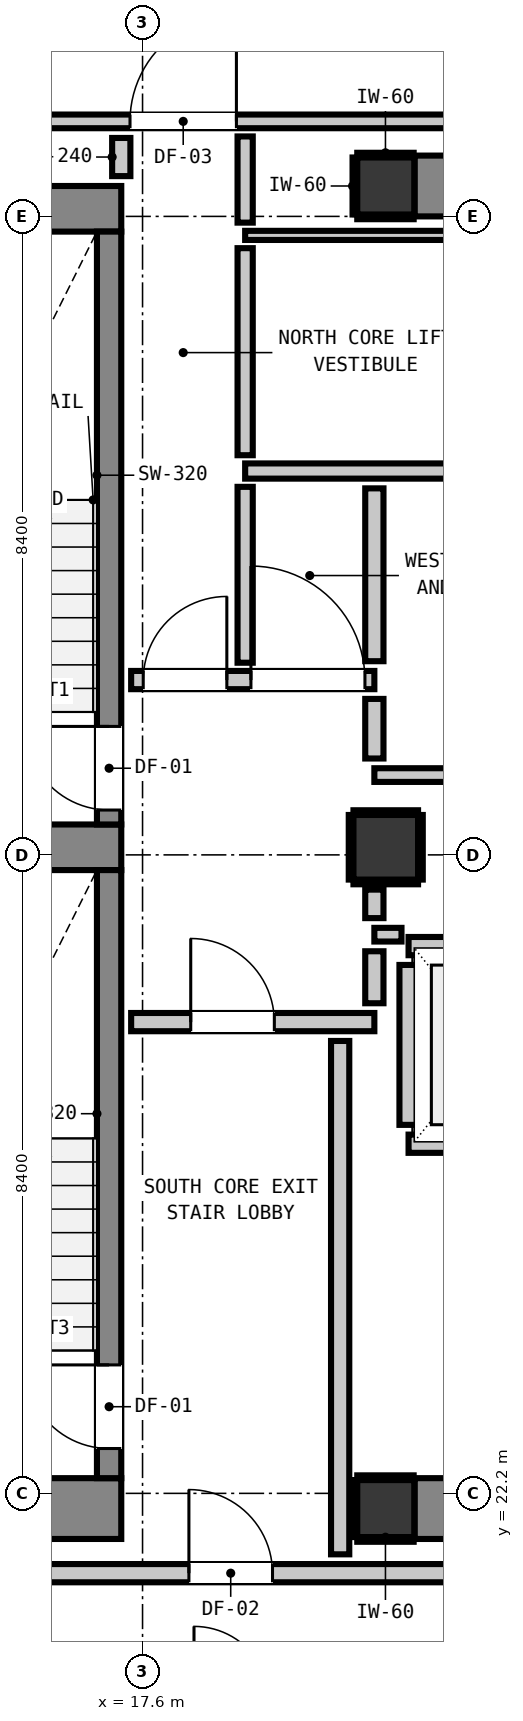
"""IFC4 building model, lengths in metres.
Left out: names, types, materials, properties, quantities, classifications, styles, units other than length and angle.
Written with IfcOpenShell. Run it as: python <this file> out.ifc"""

import sys

from ifc_helpers import new_model, si_unit, direction, frame, frame_2d, origin, origin_2d, place, context, subcontext, project, spatial, rectangle, extrude, element, fill, save


model = new_model("IFC4")
c1 = context("Model", 3, precision=1e-05, world=origin(), true_north=direction((0.0, 1.0)))
c2 = subcontext(c1, "Body", "Model", "MODEL_VIEW")
j1 = project(units=[si_unit("LENGTHUNIT", "METRE"), si_unit("PLANEANGLEUNIT", "RADIAN")], contexts=[c1])
p1 = place(None, origin())
s1 = spatial("IfcSite", under=j1, at=p1, CompositionType="ELEMENT")
p2 = place(p1, origin())
s2 = spatial("IfcBuilding", under=s1, at=p2, CompositionType="ELEMENT")
p3 = place(p2, frame((0.0, 0.0, 210.08)))
s3 = spatial("IfcBuildingStorey", under=s2, at=p3, CompositionType="ELEMENT", Elevation=210.08)
for number, where, z_axis, x_axis in (
    (1, (20.8, 22.0, 0.0), (0.0, 0.0, 1.0), (1.0, 0.0, 0.0)),
    (2, (20.8, 39.4, 0.0), (0.0, 0.0, 1.0), (1.0, 0.0, 0.0)),
):
    element("IfcColumn", number, at=place(p3, frame(where, z_axis=z_axis, x_axis=x_axis)), inside=s3, PredefinedType="COLUMN", context=c2, shape_type="SweptSolid", body=[
        extrude(rectangle(XDim=0.75, YDim=0.75, at=origin_2d()), origin(), (0.0, 0.0, 1.0), 3.32),
    ])
p4 = place(p3, frame((13.24, 22.0, 0.0), z_axis=(0.0, 0.0, 1.0), x_axis=(1.0, 0.0, 0.0)))
e3 = element("IfcWall", 3, at=p4, inside=s3, PredefinedType="SHEAR", context=c2, shape_type="SweptSolid", body=[
    extrude(rectangle(XDim=4.08, YDim=0.8, at=frame_2d((2.04, 0.0))), origin(), (0.0, 0.0, 1.0), 3.32),
])
p5 = place(p3, frame((13.24, 39.1, 0.0), z_axis=(0.0, 0.0, 1.0), x_axis=(1.0, 0.0, 0.0)))
e4 = element("IfcWall", 4, at=p5, inside=s3, PredefinedType="SHEAR", context=c2, shape_type="SweptSolid", body=[
    extrude(rectangle(XDim=4.08, YDim=0.6, at=frame_2d((2.04, 0.0))), origin(), (0.0, 0.0, 1.0), 3.32),
])
p6 = place(p3, frame((13.78, 30.7, 0.0), z_axis=(0.0, 0.0, 1.0), x_axis=(1.0, 0.0, 0.0)))
e5 = element("IfcWall", 5, at=p6, inside=s3, PredefinedType="SHEAR", context=c2, shape_type="SweptSolid", body=[
    extrude(rectangle(XDim=3.54, YDim=0.6, at=frame_2d((1.77, 0.0))), origin(), (0.0, 0.0, 1.0), 3.32),
])
for number, where, z_axis, x_axis in (
    (6, (21.18, 22.0, 0.0), (0.0, 0.0, 1.0), (1.0, 0.0, 0.0)),
    (7, (21.18, 39.4, 0.0), (0.0, 0.0, 1.0), (1.0, 0.0, 0.0)),
):
    element("IfcWall", number, at=place(p3, frame(where, z_axis=z_axis, x_axis=x_axis)), inside=s3, PredefinedType="SHEAR", context=c2, shape_type="SweptSolid", body=[
        extrude(rectangle(XDim=7.64, YDim=0.8, at=frame_2d((3.82, 0.0))), origin(), (0.0, 0.0, 1.0), 3.32),
    ])
p7 = place(p3, frame((17.16, 31.0, 0.0), z_axis=(0.0, 0.0, 1.0), x_axis=(0.0, 1.0, 0.0)))
e8 = element("IfcWall", 8, at=p7, inside=s3, PredefinedType="SHEAR", context=c2, shape_type="SweptSolid", body=[
    extrude(rectangle(XDim=7.8, YDim=0.32, at=frame_2d((3.9, 0.0))), origin(), (0.0, 0.0, 1.0), 3.32),
])
p8 = place(p7, frame((0.19, 0.0, 0.0)))
e9 = element("IfcOpeningElement", 9, at=p8, cuts=e8, PredefinedType="OPENING", context=c2, shape_type="SweptSolid", body=[
    extrude(rectangle(XDim=1.1, YDim=2.15, at=frame_2d((0.55, 1.075))), frame((0.0, 0.17, 0.0), z_axis=(0.0, -1.0, 0.0), x_axis=(1.0, 0.0, 0.0)), (0.0, 0.0, 1.0), 0.34),
])
p9 = place(p3, frame((17.16, 22.4, 0.0), z_axis=(0.0, 0.0, 1.0), x_axis=(0.0, 1.0, 0.0)))
e10 = element("IfcWall", 10, at=p9, inside=s3, PredefinedType="SHEAR", context=c2, shape_type="SweptSolid", body=[
    extrude(rectangle(XDim=8.0, YDim=0.32, at=frame_2d((4.0, 0.0))), origin(), (0.0, 0.0, 1.0), 3.32),
])
p10 = place(p9, frame((0.39, 0.0, 0.0)))
e11 = element("IfcOpeningElement", 11, at=p10, cuts=e10, PredefinedType="OPENING", context=c2, shape_type="SweptSolid", body=[
    extrude(rectangle(XDim=1.1, YDim=2.15, at=frame_2d((0.55, 1.075))), frame((0.0, 0.17, 0.0), z_axis=(0.0, -1.0, 0.0), x_axis=(1.0, 0.0, 0.0)), (0.0, 0.0, 1.0), 0.34),
])
p11 = place(p3, frame((20.8, 30.7, 0.0), z_axis=(0.0, 0.0, 1.0), x_axis=(1.0, 0.0, 0.0)))
e12 = element("IfcColumn", 12, at=p11, inside=s3, PredefinedType="COLUMN", context=c2, shape_type="SweptSolid", body=[
    extrude(rectangle(XDim=0.85, YDim=0.85, at=origin_2d()), origin(), (0.0, 0.0, 1.0), 3.32),
])
for number, where, z_axis, x_axis in (
    (13, (21.1, 26.8, 0.0), (0.0, 0.0, 1.0), (1.0, 0.0, 0.0)),
    (14, (21.1, 29.4, 0.0), (0.0, 0.0, 1.0), (1.0, 0.0, 0.0)),
):
    element("IfcWall", number, at=place(p3, frame(where, z_axis=z_axis, x_axis=x_axis)), inside=s3, PredefinedType="PARTITIONING", context=c2, shape_type="SweptSolid", body=[
        extrude(rectangle(XDim=2.2, YDim=0.24, at=frame_2d((1.1, 0.0))), origin(), (0.0, 0.0, 1.0), 3.1),
    ])
p12 = place(p3, frame((21.1, 27.048, 0.0), z_axis=(0.0, 0.0, 1.0), x_axis=(0.0, 1.0, 0.0)))
e15 = element("IfcWall", 15, at=p12, inside=s3, PredefinedType="PARTITIONING", context=c2, shape_type="SweptSolid", body=[
    extrude(rectangle(XDim=2.104, YDim=0.24, at=frame_2d((1.052, 0.0))), origin(), (0.0, 0.0, 1.0), 2.335),
])
p13 = place(p3, frame((10.787, 21.15, 0.0), z_axis=(0.0, 0.0, 1.0), x_axis=(1.0, 0.0, 0.0)))
e16 = element("IfcWall", 16, at=p13, inside=s3, PredefinedType="PARTITIONING", context=c2, shape_type="SweptSolid", body=[
    extrude(rectangle(XDim=36.626, YDim=0.24, at=frame_2d((18.313, 0.0))), origin(), (0.0, 0.0, 1.0), 3.1),
])
p14 = place(p13, frame((7.423, 0.0, 0.0)))
e17 = element("IfcOpeningElement", 17, at=p14, cuts=e16, PredefinedType="OPENING", context=c2, shape_type="SweptSolid", body=[
    extrude(rectangle(XDim=1.1, YDim=2.15, at=frame_2d((0.55, 1.075))), frame((0.0, 0.13, 0.0), z_axis=(0.0, -1.0, 0.0), x_axis=(1.0, 0.0, 0.0)), (0.0, 0.0, 1.0), 0.26),
])
p15 = place(p13, frame((31.482, 0.0, 0.0)))
e18 = element("IfcOpeningElement", 18, at=p15, cuts=e16, PredefinedType="OPENING", context=c2, shape_type="SweptSolid", body=[
    extrude(rectangle(XDim=1.0, YDim=2.15, at=frame_2d((0.5, 1.075))), frame((0.0, 0.13, 0.0), z_axis=(0.0, -1.0, 0.0), x_axis=(1.0, 0.0, 0.0)), (0.0, 0.0, 1.0), 0.26),
])
p16 = place(p3, frame((17.45, 28.4, 0.0), z_axis=(0.0, 0.0, 1.0), x_axis=(1.0, 0.0, 0.0)))
e19 = element("IfcWall", 19, at=p16, inside=s3, PredefinedType="PARTITIONING", context=c2, shape_type="SweptSolid", body=[
    extrude(rectangle(XDim=3.2, YDim=0.24, at=frame_2d((1.6, 0.0))), origin(), (0.0, 0.0, 1.0), 3.1),
])
p17 = place(p16, frame((0.784, 0.0, 0.0)))
e20 = element("IfcOpeningElement", 20, at=p17, cuts=e19, PredefinedType="OPENING", context=c2, shape_type="SweptSolid", body=[
    extrude(rectangle(XDim=1.1, YDim=2.15, at=frame_2d((0.55, 1.075))), frame((0.0, 0.13, 0.0), z_axis=(0.0, -1.0, 0.0), x_axis=(1.0, 0.0, 0.0)), (0.0, 0.0, 1.0), 0.26),
])
p18 = place(p3, frame((17.45, 32.9, 0.0), z_axis=(0.0, 0.0, 1.0), x_axis=(1.0, 0.0, 0.0)))
e21 = element("IfcWall", 21, at=p18, inside=s3, PredefinedType="PARTITIONING", context=c2, shape_type="SweptSolid", body=[
    extrude(rectangle(XDim=3.2, YDim=0.24, at=frame_2d((1.6, 0.0))), origin(), (0.0, 0.0, 1.0), 3.1),
])
p19 = place(p18, frame((0.159, 0.0, 0.0)))
e22 = element("IfcOpeningElement", 22, at=p19, cuts=e21, PredefinedType="OPENING", context=c2, shape_type="SweptSolid", body=[
    extrude(rectangle(XDim=1.1, YDim=2.15, at=frame_2d((0.55, 1.075))), frame((0.0, 0.13, 0.0), z_axis=(0.0, -1.0, 0.0), x_axis=(1.0, 0.0, 0.0)), (0.0, 0.0, 1.0), 0.26),
])
p20 = place(p18, frame((1.576, 0.0, 0.0)))
e23 = element("IfcOpeningElement", 23, at=p20, cuts=e21, PredefinedType="OPENING", context=c2, shape_type="SweptSolid", body=[
    extrude(rectangle(XDim=1.5, YDim=2.15, at=frame_2d((0.75, 1.075))), frame((0.0, 0.13, 0.0), z_axis=(0.0, -1.0, 0.0), x_axis=(1.0, 0.0, 0.0)), (0.0, 0.0, 1.0), 0.26),
])
p21 = place(p3, frame((18.95, 35.65, 0.0), z_axis=(0.0, 0.0, 1.0), x_axis=(1.0, 0.0, 0.0)))
e24 = element("IfcWall", 24, at=p21, inside=s3, PredefinedType="PARTITIONING", context=c2, shape_type="SweptSolid", body=[
    extrude(rectangle(XDim=11.025, YDim=0.2, at=frame_2d((5.513, 0.0))), origin(), (0.0, 0.0, 1.0), 3.1),
])
p22 = place(p21, frame((9.749, 0.0, 0.0)))
e25 = element("IfcOpeningElement", 25, at=p22, cuts=e24, PredefinedType="OPENING", context=c2, shape_type="SweptSolid", body=[
    extrude(rectangle(XDim=0.9, YDim=2.1, at=frame_2d((0.45, 1.05))), frame((0.0, 0.11, 0.0), z_axis=(0.0, -1.0, 0.0), x_axis=(1.0, 0.0, 0.0)), (0.0, 0.0, 1.0), 0.22),
])
p23 = place(p3, frame((20.65, 29.55, 0.0), z_axis=(0.0, 0.0, 1.0), x_axis=(1.0, 0.0, 0.0)))
e26 = element("IfcWall", 26, at=p23, inside=s3, PredefinedType="PARTITIONING", context=c2, shape_type="SweptSolid", body=[
    extrude(rectangle(XDim=0.357, YDim=0.18, at=frame_2d((0.179, 0.0))), origin(), (0.0, 0.0, 1.0), 3.1),
])
p24 = place(p3, frame((20.65, 31.65, 0.0), z_axis=(0.0, 0.0, 1.0), x_axis=(1.0, 0.0, 0.0)))
e27 = element("IfcWall", 27, at=p24, inside=s3, PredefinedType="PARTITIONING", context=c2, shape_type="SweptSolid", body=[
    extrude(rectangle(XDim=7.7, YDim=0.18, at=frame_2d((3.85, 0.0))), origin(), (0.0, 0.0, 1.0), 3.1),
])
p25 = place(p24, frame((4.673, 0.0, 0.0)))
e28 = element("IfcOpeningElement", 28, at=p25, cuts=e27, PredefinedType="OPENING", context=c2, shape_type="SweptSolid", body=[
    extrude(rectangle(XDim=0.9, YDim=2.1, at=frame_2d((0.45, 1.05))), frame((0.0, 0.1, 0.0), z_axis=(0.0, -1.0, 0.0), x_axis=(1.0, 0.0, 0.0)), (0.0, 0.0, 1.0), 0.2),
])
p26 = place(p3, frame((10.787, 40.25, 0.0), z_axis=(0.0, 0.0, 1.0), x_axis=(1.0, 0.0, 0.0)))
e29 = element("IfcWall", 29, at=p26, inside=s3, PredefinedType="PARTITIONING", context=c2, shape_type="SweptSolid", body=[
    extrude(rectangle(XDim=26.102, YDim=0.18, at=frame_2d((13.051, 0.0))), origin(), (0.0, 0.0, 1.0), 3.1),
])
p27 = place(p26, frame((6.648, 0.0, 0.0)))
e30 = element("IfcOpeningElement", 30, at=p27, cuts=e29, PredefinedType="OPENING", context=c2, shape_type="SweptSolid", body=[
    extrude(rectangle(XDim=1.4, YDim=2.15, at=frame_2d((0.7, 1.075))), frame((0.0, 0.1, 0.0), z_axis=(0.0, -1.0, 0.0), x_axis=(1.0, 0.0, 0.0)), (0.0, 0.0, 1.0), 0.2),
])
p28 = place(p3, frame((18.95, 38.75, 0.0), z_axis=(0.0, 0.0, 1.0), x_axis=(1.0, 0.0, 0.0)))
e31 = element("IfcWall", 31, at=p28, inside=s3, PredefinedType="PARTITIONING", context=c2, shape_type="SweptSolid", body=[
    extrude(rectangle(XDim=13.56, YDim=0.12, at=frame_2d((6.78, 0.0))), origin(), (0.0, 0.0, 1.0), 3.1),
])
p29 = place(p3, frame((17.32, 39.53, 0.0), z_axis=(0.0, 0.0, 1.0), x_axis=(0.0, 1.0, 0.0)))
e32 = element("IfcWall", 32, at=p29, inside=s3, PredefinedType="PARTITIONING", context=c2, shape_type="SweptSolid", body=[
    extrude(rectangle(XDim=0.502, YDim=0.24, at=frame_2d((0.251, 0.0))), origin(), (0.0, 0.0, 1.0), 3.1),
])
p30 = place(p3, frame((20.2, 21.398, 0.0), z_axis=(0.0, 0.0, 1.0), x_axis=(0.0, 1.0, 0.0)))
e33 = element("IfcWall", 33, at=p30, inside=s3, PredefinedType="PARTITIONING", context=c2, shape_type="SweptSolid", body=[
    extrude(rectangle(XDim=6.754, YDim=0.24, at=frame_2d((3.377, 0.0))), origin(), (0.0, 0.0, 1.0), 3.1),
])
p31 = place(p3, frame((20.65, 28.648, 0.0), z_axis=(0.0, 0.0, 1.0), x_axis=(0.0, 1.0, 0.0)))
e34 = element("IfcWall", 34, at=p31, inside=s3, PredefinedType="PARTITIONING", context=c2, shape_type="SweptSolid", body=[
    extrude(rectangle(XDim=0.684, YDim=0.24, at=frame_2d((0.342, 0.0))), origin(), (0.0, 0.0, 1.0), 2.335),
])
p32 = place(p3, frame((20.65, 29.768, 0.0), z_axis=(0.0, 0.0, 1.0), x_axis=(0.0, 1.0, 0.0)))
e35 = element("IfcWall", 35, at=p32, inside=s3, PredefinedType="PARTITIONING", context=c2, shape_type="SweptSolid", body=[
    extrude(rectangle(XDim=0.375, YDim=0.24, at=frame_2d((0.188, 0.0))), origin(), (0.0, 0.0, 1.0), 2.335),
])
p33 = place(p3, frame((20.65, 31.868, 0.0), z_axis=(0.0, 0.0, 1.0), x_axis=(0.0, 1.0, 0.0)))
e36 = element("IfcWall", 36, at=p33, inside=s3, PredefinedType="PARTITIONING", context=c2, shape_type="SweptSolid", body=[
    extrude(rectangle(XDim=0.784, YDim=0.24, at=frame_2d((0.392, 0.0))), origin(), (0.0, 0.0, 1.0), 2.335),
])
p34 = place(p3, frame((20.65, 33.148, 0.0), z_axis=(0.0, 0.0, 1.0), x_axis=(0.0, 1.0, 0.0)))
e37 = element("IfcWall", 37, at=p34, inside=s3, PredefinedType="PARTITIONING", context=c2, shape_type="SweptSolid", body=[
    extrude(rectangle(XDim=2.274, YDim=0.24, at=frame_2d((1.137, 0.0))), origin(), (0.0, 0.0, 1.0), 2.335),
])
p35 = place(p3, frame((18.95, 33.128, 0.0), z_axis=(0.0, 0.0, 1.0), x_axis=(0.0, 1.0, 0.0)))
e38 = element("IfcWall", 38, at=p35, inside=s3, PredefinedType="PARTITIONING", context=c2, shape_type="SweptSolid", body=[
    extrude(rectangle(XDim=2.314, YDim=0.2, at=frame_2d((1.157, 0.0))), origin(), (0.0, 0.0, 1.0), 3.1),
])
p36 = place(p3, frame((18.95, 35.858, 0.0), z_axis=(0.0, 0.0, 1.0), x_axis=(0.0, 1.0, 0.0)))
e39 = element("IfcWall", 39, at=p36, inside=s3, PredefinedType="PARTITIONING", context=c2, shape_type="SweptSolid", body=[
    extrude(rectangle(XDim=2.724, YDim=0.2, at=frame_2d((1.362, 0.0))), origin(), (0.0, 0.0, 1.0), 3.1),
])
p37 = place(p3, frame((18.95, 38.918, 0.0), z_axis=(0.0, 0.0, 1.0), x_axis=(0.0, 1.0, 0.0)))
e40 = element("IfcWall", 40, at=p37, inside=s3, PredefinedType="PARTITIONING", context=c2, shape_type="SweptSolid", body=[
    extrude(rectangle(XDim=1.134, YDim=0.2, at=frame_2d((0.567, 0.0))), origin(), (0.0, 0.0, 1.0), 3.1),
])
for number, where, z_axis, x_axis in (
    (41, (20.425, 21.593, 0.0), (0.0, 0.0, 1.0), (1.0, 0.0, 0.0)),
    (42, (20.425, 22.407, 0.0), (0.0, 0.0, 1.0), (1.0, 0.0, 0.0)),
):
    element("IfcWall", number, at=place(p3, frame(where, z_axis=z_axis, x_axis=x_axis)), inside=s3, PredefinedType="PARTITIONING", context=c2, shape_type="SweptSolid", body=[
        extrude(rectangle(XDim=0.742, YDim=0.06, at=frame_2d((0.371, 0.0))), origin(), (0.0, 0.0, 1.0), 1.45),
    ])
p38 = place(p3, frame((20.393, 21.625, 0.0), z_axis=(0.0, 0.0, 1.0), x_axis=(0.0, 1.0, 0.0)))
e43 = element("IfcWall", 43, at=p38, inside=s3, PredefinedType="PARTITIONING", context=c2, shape_type="SweptSolid", body=[
    extrude(rectangle(XDim=0.75, YDim=0.06, at=frame_2d((0.375, 0.0))), origin(), (0.0, 0.0, 1.0), 1.45),
])
for number, where, z_axis, x_axis in (
    (44, (20.425, 38.993, 0.0), (0.0, 0.0, 1.0), (1.0, 0.0, 0.0)),
    (45, (20.425, 39.807, 0.0), (0.0, 0.0, 1.0), (1.0, 0.0, 0.0)),
):
    element("IfcWall", number, at=place(p3, frame(where, z_axis=z_axis, x_axis=x_axis)), inside=s3, PredefinedType="PARTITIONING", context=c2, shape_type="SweptSolid", body=[
        extrude(rectangle(XDim=0.742, YDim=0.06, at=frame_2d((0.371, 0.0))), origin(), (0.0, 0.0, 1.0), 1.45),
    ])
p39 = place(p3, frame((20.393, 39.025, 0.0), z_axis=(0.0, 0.0, 1.0), x_axis=(0.0, 1.0, 0.0)))
e46 = element("IfcWall", 46, at=p39, inside=s3, PredefinedType="PARTITIONING", context=c2, shape_type="SweptSolid", body=[
    extrude(rectangle(XDim=0.75, YDim=0.06, at=frame_2d((0.375, 0.0))), origin(), (0.0, 0.0, 1.0), 1.45),
])
for number, where, z_axis, x_axis in (
    (47, (20.375, 30.243, 0.0), (0.0, 0.0, 1.0), (1.0, 0.0, 0.0)),
    (48, (20.375, 31.157, 0.0), (0.0, 0.0, 1.0), (1.0, 0.0, 0.0)),
    (49, (20.343, 30.275, 0.0), (0.0, 0.0, 1.0), (0.0, 1.0, 0.0)),
    (50, (21.257, 30.275, 0.0), (0.0, 0.0, 1.0), (0.0, 1.0, 0.0)),
):
    element("IfcWall", number, at=place(p3, frame(where, z_axis=z_axis, x_axis=x_axis)), inside=s3, PredefinedType="PARTITIONING", context=c2, shape_type="SweptSolid", body=[
        extrude(rectangle(XDim=0.85, YDim=0.06, at=frame_2d((0.425, 0.0))), origin(), (0.0, 0.0, 1.0), 1.45),
    ])
p40 = place(p8, origin())
e51 = element("IfcDoor", 51, at=p40, inside=s3, OperationType="SINGLE_SWING_RIGHT", PredefinedType="DOOR", context=c2, shape_type="SweptSolid", body=[
    extrude(rectangle(XDim=1.1, YDim=2.15, at=frame_2d((0.55, 1.075))), frame((0.0, 0.025, 0.0), z_axis=(0.0, -1.0, 0.0), x_axis=(1.0, 0.0, 0.0)), (0.0, 0.0, 1.0), 0.05),
])
fill(e9, e51)
p41 = place(p10, origin())
e52 = element("IfcDoor", 52, at=p41, inside=s3, OperationType="SINGLE_SWING_RIGHT", PredefinedType="DOOR", context=c2, shape_type="SweptSolid", body=[
    extrude(rectangle(XDim=1.1, YDim=2.15, at=frame_2d((0.55, 1.075))), frame((0.0, 0.025, 0.0), z_axis=(0.0, -1.0, 0.0), x_axis=(1.0, 0.0, 0.0)), (0.0, 0.0, 1.0), 0.05),
])
fill(e11, e52)
p42 = place(p17, origin())
e53 = element("IfcDoor", 53, at=p42, inside=s3, OperationType="SINGLE_SWING_LEFT", PredefinedType="DOOR", context=c2, shape_type="SweptSolid", body=[
    extrude(rectangle(XDim=1.1, YDim=2.15, at=frame_2d((0.55, 1.075))), frame((0.0, 0.025, 0.0), z_axis=(0.0, -1.0, 0.0), x_axis=(1.0, 0.0, 0.0)), (0.0, 0.0, 1.0), 0.05),
])
fill(e20, e53)
p43 = place(p19, origin())
e54 = element("IfcDoor", 54, at=p43, inside=s3, OperationType="SINGLE_SWING_RIGHT", PredefinedType="DOOR", context=c2, shape_type="SweptSolid", body=[
    extrude(rectangle(XDim=1.1, YDim=2.15, at=frame_2d((0.55, 1.075))), frame((0.0, 0.025, 0.0), z_axis=(0.0, -1.0, 0.0), x_axis=(1.0, 0.0, 0.0)), (0.0, 0.0, 1.0), 0.05),
])
fill(e22, e54)
p44 = place(p14, origin())
e55 = element("IfcDoor", 55, at=p44, inside=s3, OperationType="SINGLE_SWING_LEFT", PredefinedType="DOOR", context=c2, shape_type="SweptSolid", body=[
    extrude(rectangle(XDim=1.1, YDim=2.15, at=frame_2d((0.55, 1.075))), frame((0.0, 0.025, 0.0), z_axis=(0.0, -1.0, 0.0), x_axis=(1.0, 0.0, 0.0)), (0.0, 0.0, 1.0), 0.05),
])
fill(e17, e55)
p45 = place(p27, origin())
e56 = element("IfcDoor", 56, at=p45, inside=s3, OperationType="SINGLE_SWING_RIGHT", PredefinedType="DOOR", context=c2, shape_type="SweptSolid", body=[
    extrude(rectangle(XDim=1.4, YDim=2.15, at=frame_2d((0.7, 1.075))), frame((0.0, 0.025, 0.0), z_axis=(0.0, -1.0, 0.0), x_axis=(1.0, 0.0, 0.0)), (0.0, 0.0, 1.0), 0.05),
])
fill(e30, e56)
p46 = place(p20, origin())
e57 = element("IfcDoor", 57, at=p46, inside=s3, OperationType="SINGLE_SWING_LEFT", PredefinedType="DOOR", context=c2, shape_type="SweptSolid", body=[
    extrude(rectangle(XDim=1.5, YDim=2.15, at=frame_2d((0.75, 1.075))), frame((0.0, 0.025, 0.0), z_axis=(0.0, -1.0, 0.0), x_axis=(1.0, 0.0, 0.0)), (0.0, 0.0, 1.0), 0.05),
])
fill(e23, e57)
save(model, sys.argv[1])
